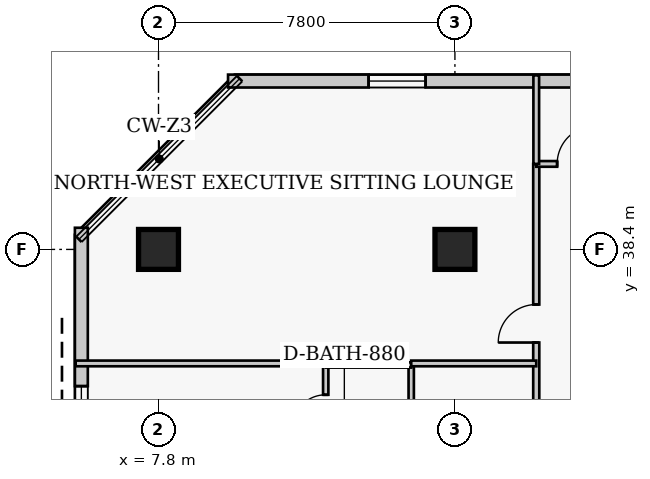
"""IFC4 building model, lengths in metres.
Left out: names, types, materials, properties, quantities, classifications, styles, units other than length and angle.
Written with IfcOpenShell. Run it as: python <this file> out.ifc"""

import sys

from ifc_helpers import new_model, si_unit, direction, frame, frame_2d, origin, origin_2d, place, context, subcontext, project, spatial, rectangle, extrude, element, fill, save


model = new_model("IFC4")
c1 = context("Model", 3, precision=1e-05, world=origin(), true_north=direction((0.0, 1.0)))
c2 = subcontext(c1, "Body", "Model", "MODEL_VIEW")
j1 = project(units=[si_unit("LENGTHUNIT", "METRE"), si_unit("PLANEANGLEUNIT", "RADIAN")], contexts=[c1])
p1 = place(None, origin())
s1 = spatial("IfcSite", under=j1, at=p1, CompositionType="ELEMENT")
p2 = place(p1, origin())
s2 = spatial("IfcBuilding", under=s1, at=p2, CompositionType="ELEMENT")
p3 = place(p2, frame((0.0, 0.0, 180.2)))
s3 = spatial("IfcBuildingStorey", under=s2, at=p3, CompositionType="ELEMENT", Elevation=180.2)
for number, where, z_axis, x_axis in (
    (1, (7.8, 38.4, 0.0), (0.0, 0.0, 1.0), (1.0, 0.0, 0.0)),
    (2, (15.6, 38.4, 0.0), (0.0, 0.0, 1.0), (1.0, 0.0, 0.0)),
):
    element("IfcColumn", number, at=place(p3, frame(where, z_axis=z_axis, x_axis=x_axis)), inside=s3, PredefinedType="COLUMN", context=c2, shape_type="SweptSolid", body=[
        extrude(rectangle(XDim=1.05, YDim=1.05, at=origin_2d()), origin(), (0.0, 0.0, 1.0), 3.8),
    ])
p4 = place(p3, frame((36.32, 42.83, 0.0), z_axis=(0.0, 0.0, 1.0), x_axis=(-1.0, 0.0, 0.0)))
e3 = element("IfcWall", 3, at=p4, inside=s3, PredefinedType="SOLIDWALL", context=c2, shape_type="SweptSolid", body=[
    extrude(rectangle(XDim=26.69, YDim=0.34, at=frame_2d((13.345, 0.0))), origin(), (0.0, 0.0, 1.0), 3.42),
])
p5 = place(p4, frame((7.32, 0.0, 0.0)))
e4 = element("IfcOpeningElement", 4, at=p5, cuts=e3, PredefinedType="OPENING", context=c2, shape_type="SweptSolid", body=[
    extrude(rectangle(XDim=1.4, YDim=2.15, at=frame_2d((0.7, 1.075))), frame((0.0, 0.18, 0.0), z_axis=(0.0, -1.0, 0.0), x_axis=(1.0, 0.0, 0.0)), (0.0, 0.0, 1.0), 0.36),
])
p6 = place(p4, frame((2.548, 0.0, 0.85)))
e5 = element("IfcOpeningElement", 5, at=p6, cuts=e3, PredefinedType="OPENING", context=c2, shape_type="SweptSolid", body=[
    extrude(rectangle(XDim=1.5, YDim=1.75, at=frame_2d((0.75, 0.875))), frame((0.0, 0.18, 0.0), z_axis=(0.0, -1.0, 0.0), x_axis=(1.0, 0.0, 0.0)), (0.0, 0.0, 1.0), 0.36),
])
p7 = place(p4, frame((12.595, 0.0, 0.85)))
e6 = element("IfcOpeningElement", 6, at=p7, cuts=e3, PredefinedType="OPENING", context=c2, shape_type="SweptSolid", body=[
    extrude(rectangle(XDim=1.5, YDim=1.75, at=frame_2d((0.75, 0.875))), frame((0.0, 0.18, 0.0), z_axis=(0.0, -1.0, 0.0), x_axis=(1.0, 0.0, 0.0)), (0.0, 0.0, 1.0), 0.36),
])
p8 = place(p4, frame((21.492, 0.0, 0.85)))
e7 = element("IfcOpeningElement", 7, at=p8, cuts=e3, PredefinedType="OPENING", context=c2, shape_type="SweptSolid", body=[
    extrude(rectangle(XDim=1.5, YDim=1.75, at=frame_2d((0.75, 0.875))), frame((0.0, 0.18, 0.0), z_axis=(0.0, -1.0, 0.0), x_axis=(1.0, 0.0, 0.0)), (0.0, 0.0, 1.0), 0.36),
])
p9 = place(p3, frame((5.77, 38.97, 0.0), z_axis=(0.0, 0.0, 1.0), x_axis=(0.0, -1.0, 0.0)))
e8 = element("IfcWall", 8, at=p9, inside=s3, PredefinedType="SOLIDWALL", context=c2, shape_type="SweptSolid", body=[
    extrude(rectangle(XDim=30.14, YDim=0.34, at=frame_2d((15.07, 0.0))), origin(), (0.0, 0.0, 1.0), 3.42),
])
p10 = place(p9, frame((4.167, 0.0, 0.85)))
e9 = element("IfcOpeningElement", 9, at=p10, cuts=e8, PredefinedType="OPENING", context=c2, shape_type="SweptSolid", body=[
    extrude(rectangle(XDim=1.5, YDim=1.75, at=frame_2d((0.75, 0.875))), frame((0.0, 0.18, 0.0), z_axis=(0.0, -1.0, 0.0), x_axis=(1.0, 0.0, 0.0)), (0.0, 0.0, 1.0), 0.36),
])
p11 = place(p9, frame((10.552, 0.0, 0.85)))
e10 = element("IfcOpeningElement", 10, at=p11, cuts=e8, PredefinedType="OPENING", context=c2, shape_type="SweptSolid", body=[
    extrude(rectangle(XDim=1.5, YDim=1.75, at=frame_2d((0.75, 0.875))), frame((0.0, 0.18, 0.0), z_axis=(0.0, -1.0, 0.0), x_axis=(1.0, 0.0, 0.0)), (0.0, 0.0, 1.0), 0.36),
])
p12 = place(p9, frame((16.938, 0.0, 0.85)))
e11 = element("IfcOpeningElement", 11, at=p12, cuts=e8, PredefinedType="OPENING", context=c2, shape_type="SweptSolid", body=[
    extrude(rectangle(XDim=1.5, YDim=1.75, at=frame_2d((0.75, 0.875))), frame((0.0, 0.18, 0.0), z_axis=(0.0, -1.0, 0.0), x_axis=(1.0, 0.0, 0.0)), (0.0, 0.0, 1.0), 0.36),
])
p13 = place(p9, frame((25.623, 0.0, 0.85)))
e12 = element("IfcOpeningElement", 12, at=p13, cuts=e8, PredefinedType="OPENING", context=c2, shape_type="SweptSolid", body=[
    extrude(rectangle(XDim=1.5, YDim=1.75, at=frame_2d((0.75, 0.875))), frame((0.0, 0.18, 0.0), z_axis=(0.0, -1.0, 0.0), x_axis=(1.0, 0.0, 0.0)), (0.0, 0.0, 1.0), 0.36),
])
p14 = place(p3, frame((17.74, 6.85, 0.0), z_axis=(0.0, 0.0, 1.0), x_axis=(0.0, 1.0, 0.0)))
e13 = element("IfcWall", 13, at=p14, inside=s3, PredefinedType="PARTITIONING", context=c2, shape_type="SweptSolid", body=[
    extrude(rectangle(XDim=33.8, YDim=0.16, at=frame_2d((16.9, 0.0))), origin(), (0.0, 0.0, 1.0), 3.42),
])
p15 = place(p14, frame((1.7, 0.0, 0.0)))
e14 = element("IfcOpeningElement", 14, at=p15, cuts=e13, PredefinedType="OPENING", context=c2, shape_type="SweptSolid", body=[
    extrude(rectangle(XDim=0.95, YDim=2.1, at=frame_2d((0.475, 1.05))), frame((0.0, 0.09, 0.0), z_axis=(0.0, -1.0, 0.0), x_axis=(1.0, 0.0, 0.0)), (0.0, 0.0, 1.0), 0.18),
])
p16 = place(p14, frame((8.275, 0.0, 0.0)))
e15 = element("IfcOpeningElement", 15, at=p16, cuts=e13, PredefinedType="OPENING", context=c2, shape_type="SweptSolid", body=[
    extrude(rectangle(XDim=0.95, YDim=2.1, at=frame_2d((0.475, 1.05))), frame((0.0, 0.09, 0.0), z_axis=(0.0, -1.0, 0.0), x_axis=(1.0, 0.0, 0.0)), (0.0, 0.0, 1.0), 0.18),
])
p17 = place(p14, frame((17.075, 0.0, 0.0)))
e16 = element("IfcOpeningElement", 16, at=p17, cuts=e13, PredefinedType="OPENING", context=c2, shape_type="SweptSolid", body=[
    extrude(rectangle(XDim=0.95, YDim=2.1, at=frame_2d((0.475, 1.05))), frame((0.0, 0.09, 0.0), z_axis=(0.0, -1.0, 0.0), x_axis=(1.0, 0.0, 0.0)), (0.0, 0.0, 1.0), 0.18),
])
p18 = place(p14, frame((24.775, 0.0, 0.0)))
e17 = element("IfcOpeningElement", 17, at=p18, cuts=e13, PredefinedType="OPENING", context=c2, shape_type="SweptSolid", body=[
    extrude(rectangle(XDim=0.95, YDim=2.1, at=frame_2d((0.475, 1.05))), frame((0.0, 0.09, 0.0), z_axis=(0.0, -1.0, 0.0), x_axis=(1.0, 0.0, 0.0)), (0.0, 0.0, 1.0), 0.18),
])
p19 = place(p14, frame((29.1, 0.0, 0.0)))
e18 = element("IfcOpeningElement", 18, at=p19, cuts=e13, PredefinedType="OPENING", context=c2, shape_type="SweptSolid", body=[
    extrude(rectangle(XDim=1.0, YDim=2.15, at=frame_2d((0.5, 1.075))), frame((0.0, 0.09, 0.0), z_axis=(0.0, -1.0, 0.0), x_axis=(1.0, 0.0, 0.0)), (0.0, 0.0, 1.0), 0.18),
])
p20 = place(p3, frame((17.74, 40.65, 0.0), z_axis=(0.0, 0.0, 1.0), x_axis=(1.0, 0.0, 0.0)))
e19 = element("IfcWall", 19, at=p20, inside=s3, PredefinedType="PARTITIONING", context=c2, shape_type="SweptSolid", body=[
    extrude(rectangle(XDim=4.36, YDim=0.15, at=frame_2d((2.18, 0.0))), origin(), (0.0, 0.0, 1.0), 3.42),
])
p21 = place(p20, frame((0.55, 0.0, 0.0)))
e20 = element("IfcOpeningElement", 20, at=p21, cuts=e19, PredefinedType="OPENING", context=c2, shape_type="SweptSolid", body=[
    extrude(rectangle(XDim=1.0, YDim=2.15, at=frame_2d((0.5, 1.075))), frame((0.0, 0.085, 0.0), z_axis=(0.0, -1.0, 0.0), x_axis=(1.0, 0.0, 0.0)), (0.0, 0.0, 1.0), 0.17),
])
p22 = place(p3, frame((17.74, 40.65, 0.0), z_axis=(0.0, 0.0, 1.0), x_axis=(0.0, 1.0, 0.0)))
e21 = element("IfcWall", 21, at=p22, inside=s3, PredefinedType="PARTITIONING", context=c2, shape_type="SweptSolid", body=[
    extrude(rectangle(XDim=2.33, YDim=0.15, at=frame_2d((1.165, 0.0))), origin(), (0.0, 0.0, 1.0), 3.42),
])
p23 = place(p3, frame((12.2, 32.91, 0.0), z_axis=(0.0, 0.0, 1.0), x_axis=(0.0, 1.0, 0.0)))
e22 = element("IfcWall", 22, at=p23, inside=s3, PredefinedType="PLUMBINGWALL", context=c2, shape_type="SweptSolid", body=[
    extrude(rectangle(XDim=2.45, YDim=0.14, at=frame_2d((1.225, 0.0))), origin(), (0.0, 0.0, 1.0), 3.42),
])
p24 = place(p23, frame((0.785, 0.0, 0.0)))
e23 = element("IfcOpeningElement", 23, at=p24, cuts=e22, PredefinedType="OPENING", context=c2, shape_type="SweptSolid", body=[
    extrude(rectangle(XDim=0.88, YDim=2.05, at=frame_2d((0.44, 1.025))), frame((0.0, 0.08, 0.0), z_axis=(0.0, -1.0, 0.0), x_axis=(1.0, 0.0, 0.0)), (0.0, 0.0, 1.0), 0.16),
])
p25 = place(p3, frame((14.45, 32.91, 0.0), z_axis=(0.0, 0.0, 1.0), x_axis=(0.0, 1.0, 0.0)))
e24 = element("IfcWall", 24, at=p25, inside=s3, PredefinedType="PLUMBINGWALL", context=c2, shape_type="SweptSolid", body=[
    extrude(rectangle(XDim=2.45, YDim=0.14, at=frame_2d((1.225, 0.0))), origin(), (0.0, 0.0, 1.0), 3.42),
])
p26 = place(p3, frame((12.2, 35.36, 0.0), z_axis=(0.0, 0.0, 1.0), x_axis=(1.0, 0.0, 0.0)))
e25 = element("IfcWall", 25, at=p26, inside=s3, PredefinedType="PLUMBINGWALL", context=c2, shape_type="SweptSolid", body=[
    extrude(rectangle(XDim=2.25, YDim=0.14, at=frame_2d((1.125, 0.0))), origin(), (0.0, 0.0, 1.0), 3.42),
])
p27 = place(p3, frame((5.62, 35.4, 0.0), z_axis=(0.0, 0.0, 1.0), x_axis=(1.0, 0.0, 0.0)))
e26 = element("IfcWall", 26, at=p27, inside=s3, PredefinedType="PARTITIONING", context=c2, shape_type="SweptSolid", body=[
    extrude(rectangle(XDim=6.58, YDim=0.15, at=frame_2d((3.29, 0.0))), origin(), (0.0, 0.0, 1.0), 3.42),
])
p28 = place(p3, frame((14.45, 35.4, 0.0), z_axis=(0.0, 0.0, 1.0), x_axis=(1.0, 0.0, 0.0)))
e27 = element("IfcWall", 27, at=p28, inside=s3, PredefinedType="PARTITIONING", context=c2, shape_type="SweptSolid", body=[
    extrude(rectangle(XDim=3.29, YDim=0.15, at=frame_2d((1.645, 0.0))), origin(), (0.0, 0.0, 1.0), 3.42),
])
p29 = place(p8, origin())
e28 = element("IfcWindow", 28, at=p29, inside=s3, PartitioningType="SINGLE_PANEL", PredefinedType="WINDOW", context=c2, shape_type="SweptSolid", body=[
    extrude(rectangle(XDim=1.5, YDim=1.75, at=frame_2d((0.75, 0.875))), frame((0.0, 0.03, 0.0), z_axis=(0.0, -1.0, 0.0), x_axis=(1.0, 0.0, 0.0)), (0.0, 0.0, 1.0), 0.06),
])
fill(e7, e28)
p30 = place(p10, origin())
e29 = element("IfcWindow", 29, at=p30, inside=s3, PartitioningType="SINGLE_PANEL", PredefinedType="WINDOW", context=c2, shape_type="SweptSolid", body=[
    extrude(rectangle(XDim=1.5, YDim=1.75, at=frame_2d((0.75, 0.875))), frame((0.0, 0.03, 0.0), z_axis=(0.0, -1.0, 0.0), x_axis=(1.0, 0.0, 0.0)), (0.0, 0.0, 1.0), 0.06),
])
fill(e9, e29)
p31 = place(p21, origin())
e30 = element("IfcDoor", 30, at=p31, inside=s3, OperationType="SINGLE_SWING_RIGHT", PredefinedType="DOOR", context=c2, shape_type="SweptSolid", body=[
    extrude(rectangle(XDim=1.0, YDim=2.15, at=frame_2d((0.5, 1.075))), frame((0.0, 0.025, 0.0), z_axis=(0.0, -1.0, 0.0), x_axis=(1.0, 0.0, 0.0)), (0.0, 0.0, 1.0), 0.05),
])
fill(e20, e30)
p32 = place(p24, origin())
e31 = element("IfcDoor", 31, at=p32, inside=s3, OperationType="SINGLE_SWING_LEFT", PredefinedType="DOOR", context=c2, shape_type="SweptSolid", body=[
    extrude(rectangle(XDim=0.88, YDim=2.05, at=frame_2d((0.44, 1.025))), frame((0.0, 0.025, 0.0), z_axis=(0.0, -1.0, 0.0), x_axis=(1.0, 0.0, 0.0)), (0.0, 0.0, 1.0), 0.05),
])
fill(e23, e31)
p33 = place(p19, origin())
e32 = element("IfcDoor", 32, at=p33, inside=s3, OperationType="SINGLE_SWING_LEFT", PredefinedType="DOOR", context=c2, shape_type="SweptSolid", body=[
    extrude(rectangle(XDim=1.0, YDim=2.15, at=frame_2d((0.5, 1.075))), frame((0.0, 0.025, 0.0), z_axis=(0.0, -1.0, 0.0), x_axis=(1.0, 0.0, 0.0)), (0.0, 0.0, 1.0), 0.05),
])
fill(e18, e32)
save(model, sys.argv[1])
